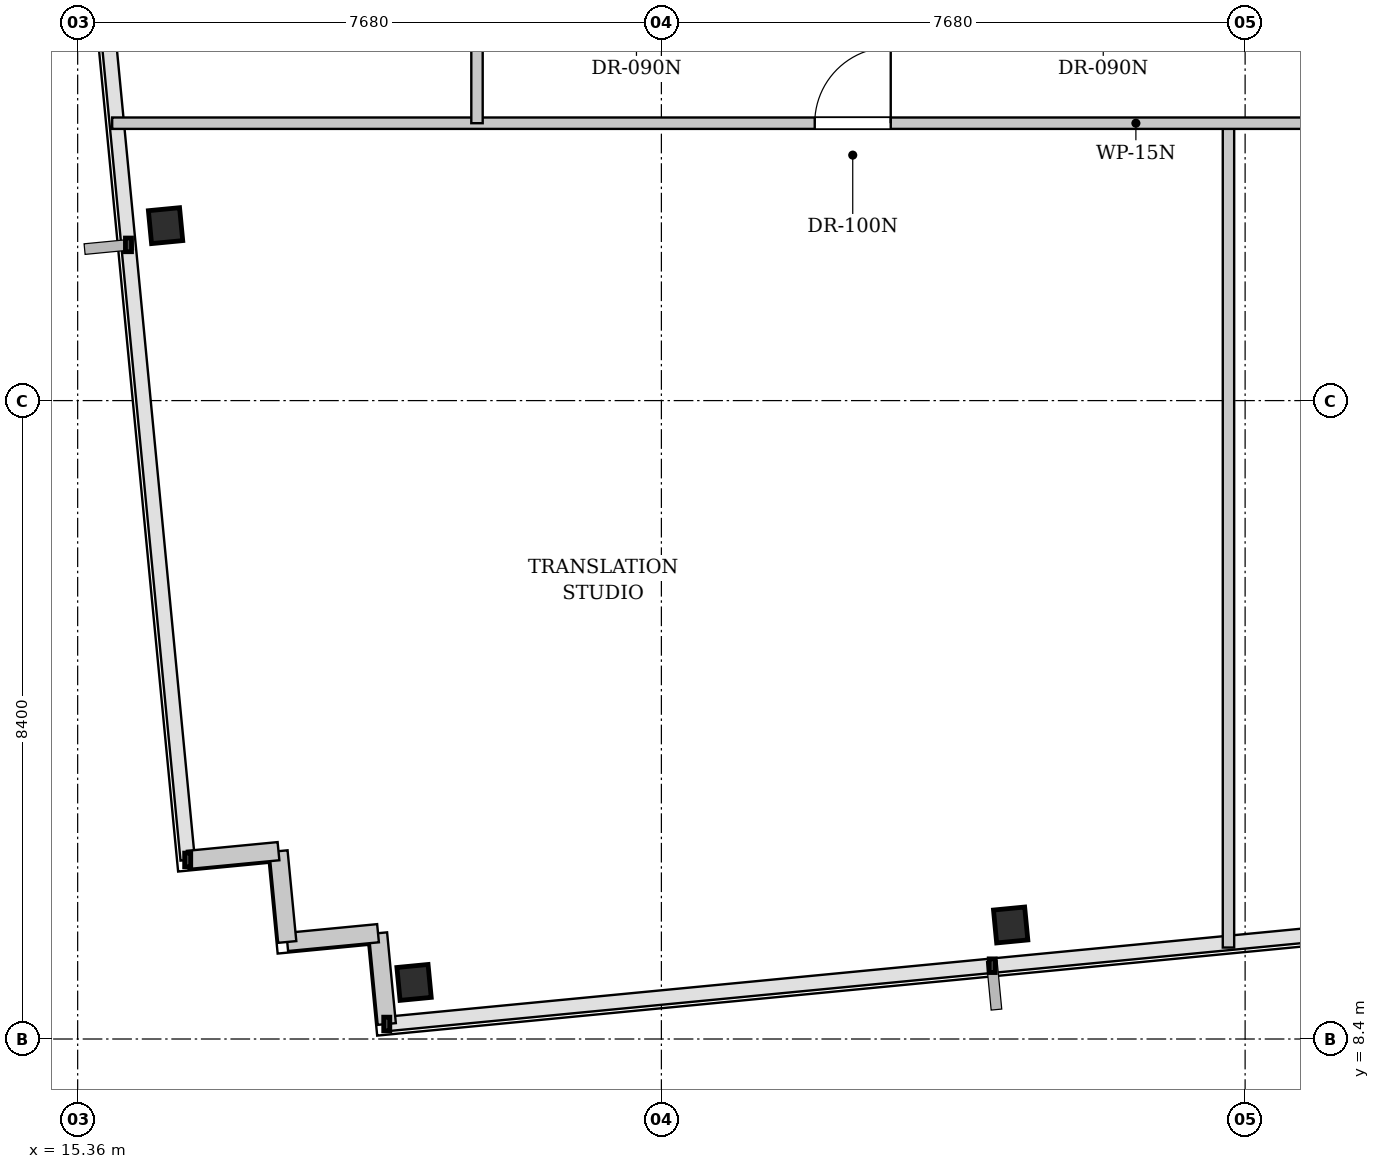
"""IFC4 building model, lengths in metres.
Left out: names, types, materials, properties, quantities, classifications, styles, units other than length and angle.
Written with IfcOpenShell. Run it as: python <this file> out.ifc"""

import sys

from ifc_helpers import new_model, si_unit, direction, frame, frame_2d, origin, origin_2d, place, context, subcontext, project, spatial, rectangle, i_section, extrude, element, fill, save


model = new_model("IFC4")
c1 = context("Model", 3, precision=1e-05, world=origin(), true_north=direction((0.0, 1.0)))
c2 = subcontext(c1, "Body", "Model", "MODEL_VIEW")
j1 = project(units=[si_unit("LENGTHUNIT", "METRE"), si_unit("PLANEANGLEUNIT", "RADIAN")], contexts=[c1])
p1 = place(None, origin())
s1 = spatial("IfcSite", under=j1, at=p1, CompositionType="ELEMENT")
p2 = place(p1, origin())
s2 = spatial("IfcBuilding", under=s1, at=p2, CompositionType="ELEMENT")
p3 = place(p2, frame((0.0, 0.0, 123.7)))
s3 = spatial("IfcBuildingStorey", under=s2, at=p3, CompositionType="ELEMENT", Elevation=123.7)
for number, where, z_axis, x_axis in (
    (1, (19.786, 9.144, 0.0), (0.0, 0.0, 1.0), (0.995, 0.096, 0.0)),
    (2, (27.635, 9.9, 0.0), (0.0, 0.0, 1.0), (0.995, 0.096, 0.0)),
    (3, (16.517, 19.102, 0.0), (0.0, 0.0, 1.0), (0.995, 0.096, 0.0)),
):
    element("IfcColumn", number, at=place(p3, frame(where, z_axis=z_axis, x_axis=x_axis)), inside=s3, PredefinedType="COLUMN", context=c2, shape_type="SweptSolid", body=[
        extrude(i_section(OverallWidth=0.412, OverallDepth=0.435, WebThickness=0.036, FlangeThickness=0.058, FilletRadius=0.015, at=origin_2d()), origin(), (0.0, 0.0, 1.0), 3.4),
    ])
for number, where, z_axis, x_axis in (
    (4, (19.427, 8.597, 0.0), (0.0, 0.0, 1.0), (-0.096, 0.995, 0.0)),
    (5, (19.312, 9.792, 0.0), (0.0, 0.0, 1.0), (-0.995, -0.096, 0.0)),
):
    element("IfcWall", number, at=place(p3, frame(where, z_axis=z_axis, x_axis=x_axis)), inside=s3, PredefinedType="SOLIDWALL", context=c2, shape_type="SweptSolid", body=[
        extrude(rectangle(XDim=1.2, YDim=0.24, at=frame_2d((0.6, 0.0))), origin(), (0.0, 0.0, 1.0), 3.18),
    ])
p4 = place(p3, frame((18.117, 9.677, 0.0), z_axis=(0.0, 0.0, 1.0), x_axis=(-0.095836473879, 0.995397091755, 0.0)))
e6 = element("IfcWall", 6, at=p4, inside=s3, PredefinedType="SOLIDWALL", context=c2, shape_type="SweptSolid", body=[
    extrude(rectangle(XDim=1.2, YDim=0.24, at=frame_2d((0.6, 0.0))), origin(), (0.0, 0.0, 1.0), 3.18),
])
p5 = place(p3, frame((18.002, 10.871, 0.0), z_axis=(0.0, 0.0, 1.0), x_axis=(-0.995398960025, -0.095817067274, 0.0)))
e7 = element("IfcWall", 7, at=p5, inside=s3, PredefinedType="SOLIDWALL", context=c2, shape_type="SweptSolid", body=[
    extrude(rectangle(XDim=1.2, YDim=0.24, at=frame_2d((0.6, 0.0))), origin(), (0.0, 0.0, 1.0), 3.18),
])
p6 = place(p3, frame((30.501, 9.604, 0.0), z_axis=(0.0, 0.0, 1.0), x_axis=(0.0, 1.0, 0.0)))
e8 = element("IfcWall", 8, at=p6, inside=s3, PredefinedType="PARTITIONING", context=c2, shape_type="SweptSolid", body=[
    extrude(rectangle(XDim=10.866, YDim=0.15, at=frame_2d((5.433, 0.0))), origin(), (0.0, 0.0, 1.0), 3.18),
])
p7 = place(p3, frame((15.814, 20.45, 0.0), z_axis=(0.0, 0.0, 1.0), x_axis=(1.0, 0.0, 0.0)))
e9 = element("IfcWall", 9, at=p7, inside=s3, PredefinedType="PARTITIONING", context=c2, shape_type="SweptSolid", body=[
    extrude(rectangle(XDim=61.222, YDim=0.15, at=frame_2d((30.611, 0.0))), origin(), (0.0, 0.0, 1.0), 3.18),
])
p8 = place(p7, frame((9.243, 0.0, 0.0)))
e10 = element("IfcOpeningElement", 10, at=p8, cuts=e9, PredefinedType="OPENING", context=c2, shape_type="SweptSolid", body=[
    extrude(rectangle(XDim=1.0, YDim=2.15, at=frame_2d((0.5, 1.075))), frame((0.0, 0.085, 0.0), z_axis=(0.0, -1.0, 0.0), x_axis=(1.0, 0.0, 0.0)), (0.0, 0.0, 1.0), 0.17),
])
p9 = place(p7, frame((19.674, 0.0, 0.0)))
e11 = element("IfcOpeningElement", 11, at=p9, cuts=e9, PredefinedType="OPENING", context=c2, shape_type="SweptSolid", body=[
    extrude(rectangle(XDim=1.0, YDim=2.15, at=frame_2d((0.5, 1.075))), frame((0.0, 0.085, 0.0), z_axis=(0.0, -1.0, 0.0), x_axis=(1.0, 0.0, 0.0)), (0.0, 0.0, 1.0), 0.17),
])
p10 = place(p7, frame((30.647, 0.0, 0.0)))
e12 = element("IfcOpeningElement", 12, at=p10, cuts=e9, PredefinedType="OPENING", context=c2, shape_type="SweptSolid", body=[
    extrude(rectangle(XDim=1.0, YDim=2.15, at=frame_2d((0.5, 1.075))), frame((0.0, 0.085, 0.0), z_axis=(0.0, -1.0, 0.0), x_axis=(1.0, 0.0, 0.0)), (0.0, 0.0, 1.0), 0.17),
])
p11 = place(p7, frame((40.021, 0.0, 0.0)))
e13 = element("IfcOpeningElement", 13, at=p11, cuts=e9, PredefinedType="OPENING", context=c2, shape_type="SweptSolid", body=[
    extrude(rectangle(XDim=1.0, YDim=2.15, at=frame_2d((0.5, 1.075))), frame((0.0, 0.085, 0.0), z_axis=(0.0, -1.0, 0.0), x_axis=(1.0, 0.0, 0.0)), (0.0, 0.0, 1.0), 0.17),
])
p12 = place(p7, frame((48.914, 0.0, 0.0)))
e14 = element("IfcOpeningElement", 14, at=p12, cuts=e9, PredefinedType="OPENING", context=c2, shape_type="SweptSolid", body=[
    extrude(rectangle(XDim=1.0, YDim=2.15, at=frame_2d((0.5, 1.075))), frame((0.0, 0.085, 0.0), z_axis=(0.0, -1.0, 0.0), x_axis=(1.0, 0.0, 0.0)), (0.0, 0.0, 1.0), 0.17),
])
p13 = place(p3, frame((20.614, 20.45, 0.0), z_axis=(0.0, 0.0, 1.0), x_axis=(0.0, 1.0, 0.0)))
e15 = element("IfcWall", 15, at=p13, inside=s3, PredefinedType="PARTITIONING", context=c2, shape_type="SweptSolid", body=[
    extrude(rectangle(XDim=25.815, YDim=0.15, at=frame_2d((12.907, 0.0))), origin(), (0.0, 0.0, 1.0), 3.18),
])
p14 = place(p13, frame((1.03, 0.0, 0.0)))
e16 = element("IfcOpeningElement", 16, at=p14, cuts=e15, PredefinedType="OPENING", context=c2, shape_type="SweptSolid", body=[
    extrude(rectangle(XDim=0.9, YDim=2.15, at=frame_2d((0.45, 1.075))), frame((0.0, 0.085, 0.0), z_axis=(0.0, -1.0, 0.0), x_axis=(1.0, 0.0, 0.0)), (0.0, 0.0, 1.0), 0.17),
])
p15 = place(p8, origin())
e17 = element("IfcDoor", 17, at=p15, inside=s3, OperationType="SINGLE_SWING_RIGHT", PredefinedType="DOOR", context=c2, shape_type="SweptSolid", body=[
    extrude(rectangle(XDim=1.0, YDim=2.15, at=frame_2d((0.5, 1.075))), frame((0.0, 0.025, 0.0), z_axis=(0.0, -1.0, 0.0), x_axis=(1.0, 0.0, 0.0)), (0.0, 0.0, 1.0), 0.05),
])
fill(e10, e17)
save(model, sys.argv[1])
